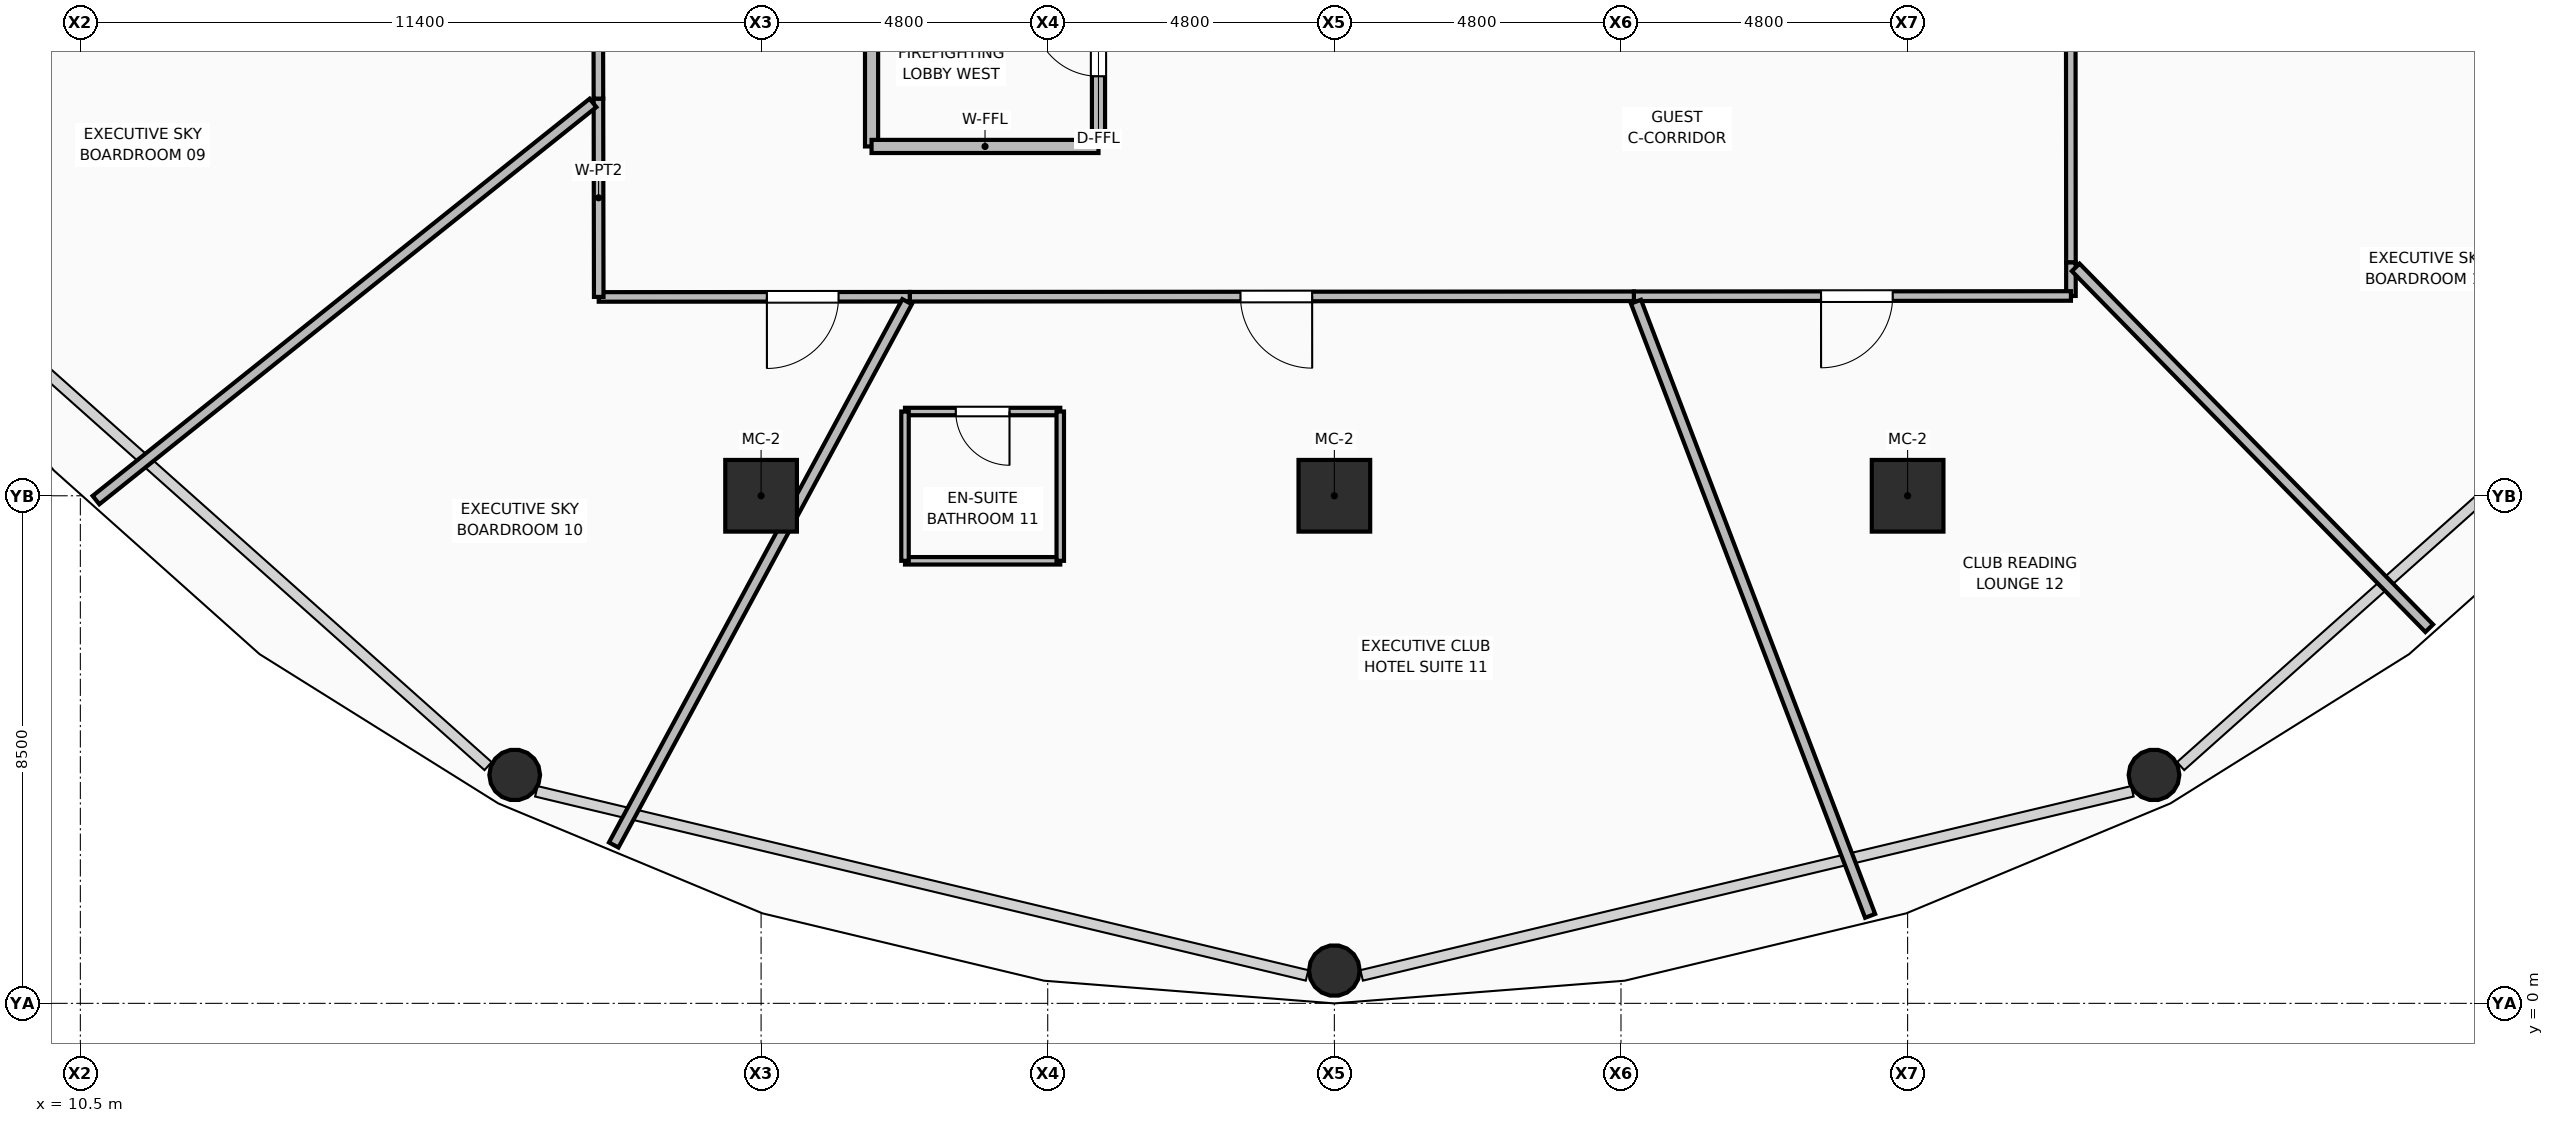
"""IFC4 building model, lengths in metres.
Left out: names, types, materials, properties, quantities, classifications, styles, units other than length and angle.
Written with IfcOpenShell. Run it as: python <this file> out.ifc"""

import sys

from ifc_helpers import new_model, si_unit, direction, frame, frame_2d, origin, origin_2d, place, context, subcontext, project, spatial, rectangle, hollow_rectangle, hollow_circle, extrude, element, fill, save


model = new_model("IFC4")
c1 = context("Model", 3, precision=1e-05, world=origin(), true_north=direction((0.0, 1.0)))
c2 = subcontext(c1, "Body", "Model", "MODEL_VIEW")
j1 = project(units=[si_unit("LENGTHUNIT", "METRE"), si_unit("PLANEANGLEUNIT", "RADIAN")], contexts=[c1])
p1 = place(None, origin())
s1 = spatial("IfcSite", under=j1, at=p1, CompositionType="ELEMENT")
p2 = place(p1, origin())
s2 = spatial("IfcBuilding", under=s1, at=p2, CompositionType="ELEMENT")
p3 = place(p2, frame((0.0, 0.0, 57.0)))
s3 = spatial("IfcBuildingStorey", under=s2, at=p3, CompositionType="ELEMENT", Elevation=57.0)
for number, where, z_axis, x_axis in (
    (1, (21.9, 8.5, 0.0), (0.0, 0.0, 1.0), (1.0, 0.0, 0.0)),
    (2, (31.5, 8.5, 0.0), (0.0, 0.0, 1.0), (1.0, 0.0, 0.0)),
    (3, (41.1, 8.5, 0.0), (0.0, 0.0, 1.0), (1.0, 0.0, 0.0)),
):
    element("IfcColumn", number, at=place(p3, frame(where, z_axis=z_axis, x_axis=x_axis)), inside=s3, PredefinedType="COLUMN", context=c2, shape_type="SweptSolid", body=[
        extrude(hollow_rectangle(XDim=1.2, YDim=1.2, WallThickness=0.045, at=origin_2d()), origin(), (0.0, 0.0, 1.0), 3.75),
    ])
for number, where, z_axis, x_axis in (
    (4, (17.774, 3.825, 0.0), (0.0, 0.0, 1.0), (1.0, 0.0, 0.0)),
    (5, (31.5, 0.549, 0.0), (0.0, 0.0, 1.0), (1.0, 0.0, 0.0)),
    (6, (45.226, 3.825, 0.0), (0.0, 0.0, 1.0), (1.0, 0.0, 0.0)),
):
    element("IfcColumn", number, at=place(p3, frame(where, z_axis=z_axis, x_axis=x_axis)), inside=s3, PredefinedType="COLUMN", context=c2, shape_type="SweptSolid", body=[
        extrude(hollow_circle(Radius=0.425, WallThickness=0.04, at=origin_2d()), origin(), (0.0, 0.0, 1.0), 3.57),
    ])
p4 = place(p3, frame((23.75, 14.35, 0.0), z_axis=(0.0, 0.0, 1.0), x_axis=(0.0, 1.0, 0.0)))
e7 = element("IfcWall", 7, at=p4, inside=s3, PredefinedType="PARTITIONING", context=c2, shape_type="SweptSolid", body=[
    extrude(rectangle(XDim=3.45, YDim=0.22, at=frame_2d((1.725, 0.0))), origin(), (0.0, 0.0, 1.0), 2.928),
])
p5 = place(p3, frame((23.75, 14.35, 0.0), z_axis=(0.0, 0.0, 1.0), x_axis=(1.0, 0.0, 0.0)))
e8 = element("IfcWall", 8, at=p5, inside=s3, PredefinedType="PARTITIONING", context=c2, shape_type="SweptSolid", body=[
    extrude(rectangle(XDim=3.8, YDim=0.22, at=frame_2d((1.9, 0.0))), origin(), (0.0, 0.0, 1.0), 3.55),
])
p6 = place(p3, frame((27.55, 14.35, 0.0), z_axis=(0.0, 0.0, 1.0), x_axis=(0.0, 1.0, 0.0)))
e9 = element("IfcWall", 9, at=p6, inside=s3, PredefinedType="PARTITIONING", context=c2, shape_type="SweptSolid", body=[
    extrude(rectangle(XDim=3.45, YDim=0.22, at=frame_2d((1.725, 0.0))), origin(), (0.0, 0.0, 1.0), 2.928),
])
p7 = place(p6, frame((1.175, 0.0, 0.0)))
e10 = element("IfcOpeningElement", 10, at=p7, cuts=e9, PredefinedType="OPENING", context=c2, shape_type="SweptSolid", body=[
    extrude(rectangle(XDim=1.1, YDim=2.1, at=frame_2d((0.55, 1.05))), frame((0.0, 0.12, 0.0), z_axis=(0.0, -1.0, 0.0), x_axis=(1.0, 0.0, 0.0)), (0.0, 0.0, 1.0), 0.24),
])
p8 = place(p3, frame((43.83, 19.568, 0.0), z_axis=(0.0, 0.0, 1.0), x_axis=(0.000681849016, -0.999999767541, 0.0)))
e11 = element("IfcWall", 11, at=p8, inside=s3, PredefinedType="PARTITIONING", context=c2, shape_type="SweptSolid", body=[
    extrude(rectangle(XDim=7.161, YDim=0.16, at=frame_2d((3.581, 0.0))), origin(), (0.0, 0.0, 1.0), 2.928),
])
p9 = place(p8, frame((0.605, 0.0, 0.0)))
e12 = element("IfcOpeningElement", 12, at=p9, cuts=e11, PredefinedType="OPENING", context=c2, shape_type="SweptSolid", body=[
    extrude(rectangle(XDim=1.2, YDim=2.1, at=frame_2d((0.6, 1.05))), frame((0.0, 0.09, 0.0), z_axis=(0.0, -1.0, 0.0), x_axis=(1.0, 0.0, 0.0)), (0.0, 0.0, 1.0), 0.18),
])
p10 = place(p3, frame((43.835, 12.407, 0.0), z_axis=(0.0, 0.0, 1.0), x_axis=(0.0, -1.0, 0.0)))
e13 = element("IfcWall", 13, at=p10, inside=s3, PredefinedType="PARTITIONING", context=c2, shape_type="SweptSolid", body=[
    extrude(rectangle(XDim=0.561, YDim=0.16, at=frame_2d((0.281, 0.0))), origin(), (0.0, 0.0, 1.0), 3.55),
])
p11 = place(p3, frame((43.835, 11.846, 0.0), z_axis=(0.0, 0.0, 1.0), x_axis=(-0.999999777452, -0.000667155766, 0.0)))
e14 = element("IfcWall", 14, at=p11, inside=s3, PredefinedType="PARTITIONING", context=c2, shape_type="SweptSolid", body=[
    extrude(rectangle(XDim=7.319, YDim=0.16, at=frame_2d((3.659, 0.0))), origin(), (0.0, 0.0, 1.0), 2.928),
])
p12 = place(p11, frame((2.985, 0.0, 0.0)))
e15 = element("IfcOpeningElement", 15, at=p12, cuts=e14, PredefinedType="OPENING", context=c2, shape_type="SweptSolid", body=[
    extrude(rectangle(XDim=1.2, YDim=2.1, at=frame_2d((0.6, 1.05))), frame((0.0, 0.09, 0.0), z_axis=(0.0, -1.0, 0.0), x_axis=(1.0, 0.0, 0.0)), (0.0, 0.0, 1.0), 0.18),
])
p13 = place(p3, frame((36.516, 11.841, 0.0), z_axis=(0.0, 0.0, 1.0), x_axis=(-0.999999779288, -0.00066439817, 0.0)))
e16 = element("IfcWall", 16, at=p13, inside=s3, PredefinedType="PARTITIONING", context=c2, shape_type="SweptSolid", body=[
    extrude(rectangle(XDim=12.126, YDim=0.16, at=frame_2d((6.063, 0.0))), origin(), (0.0, 0.0, 1.0), 2.928),
])
p14 = place(p13, frame((5.388, 0.0, 0.0)))
e17 = element("IfcOpeningElement", 17, at=p14, cuts=e16, PredefinedType="OPENING", context=c2, shape_type="SweptSolid", body=[
    extrude(rectangle(XDim=1.2, YDim=2.1, at=frame_2d((0.6, 1.05))), frame((0.0, 0.09, 0.0), z_axis=(0.0, -1.0, 0.0), x_axis=(1.0, 0.0, 0.0)), (0.0, 0.0, 1.0), 0.18),
])
p15 = place(p3, frame((24.39, 11.833, 0.0), z_axis=(0.0, 0.0, 1.0), x_axis=(-0.999999841836, -0.000562429607, 0.0)))
e18 = element("IfcWall", 18, at=p15, inside=s3, PredefinedType="PARTITIONING", context=c2, shape_type="SweptSolid", body=[
    extrude(rectangle(XDim=5.209, YDim=0.16, at=frame_2d((2.604, 0.0))), origin(), (0.0, 0.0, 1.0), 2.928),
])
p16 = place(p15, frame((1.193, 0.0, 0.0)))
e19 = element("IfcOpeningElement", 19, at=p16, cuts=e18, PredefinedType="OPENING", context=c2, shape_type="SweptSolid", body=[
    extrude(rectangle(XDim=1.2, YDim=2.1, at=frame_2d((0.6, 1.05))), frame((0.0, 0.09, 0.0), z_axis=(0.0, -1.0, 0.0), x_axis=(1.0, 0.0, 0.0)), (0.0, 0.0, 1.0), 0.18),
])
p17 = place(p3, frame((19.181, 11.83, 0.0), z_axis=(0.0, 0.0, 1.0), x_axis=(-0.001470370415, 0.999998919005, 0.0)))
e20 = element("IfcWall", 20, at=p17, inside=s3, PredefinedType="PARTITIONING", context=c2, shape_type="SweptSolid", body=[
    extrude(rectangle(XDim=3.321, YDim=0.16, at=frame_2d((1.66, 0.0))), origin(), (0.0, 0.0, 1.0), 3.55),
])
p18 = place(p3, frame((19.176, 15.151, 0.0), z_axis=(0.0, 0.0, 1.0), x_axis=(-0.001827037145, 0.999998330966, 0.0)))
e21 = element("IfcWall", 21, at=p18, inside=s3, PredefinedType="PARTITIONING", context=c2, shape_type="SweptSolid", body=[
    extrude(rectangle(XDim=6.013, YDim=0.16, at=frame_2d((3.007, 0.0))), origin(), (0.0, 0.0, 1.0), 2.928),
])
p19 = place(p18, frame((4.204, 0.0, 0.0)))
e22 = element("IfcOpeningElement", 22, at=p19, cuts=e21, PredefinedType="OPENING", context=c2, shape_type="SweptSolid", body=[
    extrude(rectangle(XDim=1.2, YDim=2.1, at=frame_2d((0.6, 1.05))), frame((0.0, 0.09, 0.0), z_axis=(0.0, -1.0, 0.0), x_axis=(1.0, 0.0, 0.0)), (0.0, 0.0, 1.0), 0.18),
])
p20 = place(p3, frame((19.085, 15.079, 0.0), z_axis=(0.0, 0.0, 1.0), x_axis=(-0.781201807071, -0.624278572938, 0.0)))
e23 = element("IfcWall", 23, at=p20, inside=s3, PredefinedType="PARTITIONING", context=c2, shape_type="SweptSolid", body=[
    extrude(rectangle(XDim=10.654, YDim=0.18, at=frame_2d((5.327, 0.0))), origin(), (0.0, 0.0, 1.0), 2.775),
])
p21 = place(p3, frame((24.345, 11.75, 0.0), z_axis=(0.0, 0.0, 1.0), x_axis=(-0.475165367646, -0.879896512887, 0.0)))
e24 = element("IfcWall", 24, at=p21, inside=s3, PredefinedType="PARTITIONING", context=c2, shape_type="SweptSolid", body=[
    extrude(rectangle(XDim=10.34, YDim=0.18, at=frame_2d((5.17, 0.0))), origin(), (0.0, 0.0, 1.0), 2.775),
])
p22 = place(p3, frame((36.551, 11.75, 0.0), z_axis=(0.0, 0.0, 1.0), x_axis=(0.356220373455, -0.934401972138, 0.0)))
e25 = element("IfcWall", 25, at=p22, inside=s3, PredefinedType="PARTITIONING", context=c2, shape_type="SweptSolid", body=[
    extrude(rectangle(XDim=11.007, YDim=0.18, at=frame_2d((5.503, 0.0))), origin(), (0.0, 0.0, 1.0), 2.775),
])
p23 = place(p3, frame((43.915, 12.325, 0.0), z_axis=(0.0, 0.0, 1.0), x_axis=(0.699796666029, -0.714342093268, 0.0)))
e26 = element("IfcWall", 26, at=p23, inside=s3, PredefinedType="PARTITIONING", context=c2, shape_type="SweptSolid", body=[
    extrude(rectangle(XDim=8.459, YDim=0.18, at=frame_2d((4.23, 0.0))), origin(), (0.0, 0.0, 1.0), 2.775),
])
p24 = place(p3, frame((43.915, 19.531, 0.0), z_axis=(0.0, 0.0, 1.0), x_axis=(0.915142788341, -0.403129851223, 0.0)))
e27 = element("IfcWall", 27, at=p24, inside=s3, PredefinedType="PARTITIONING", context=c2, shape_type="SweptSolid", body=[
    extrude(rectangle(XDim=13.675, YDim=0.18, at=frame_2d((6.838, 0.0))), origin(), (0.0, 0.0, 1.0), 2.775),
])
p25 = place(p3, frame((24.31, 7.411, 0.0), z_axis=(0.0, 0.0, 1.0), x_axis=(1.0, 0.0, 0.0)))
e28 = element("IfcWall", 28, at=p25, inside=s3, PredefinedType="PARTITIONING", context=c2, shape_type="SweptSolid", body=[
    extrude(rectangle(XDim=2.6, YDim=0.125, at=frame_2d((1.3, 0.0))), origin(), (0.0, 0.0, 1.0), 3.55),
])
p26 = place(p3, frame((24.31, 9.911, 0.0), z_axis=(0.0, 0.0, 1.0), x_axis=(1.0, 0.0, 0.0)))
e29 = element("IfcWall", 29, at=p26, inside=s3, PredefinedType="PARTITIONING", context=c2, shape_type="SweptSolid", body=[
    extrude(rectangle(XDim=2.6, YDim=0.125, at=frame_2d((1.3, 0.0))), origin(), (0.0, 0.0, 1.0), 3.55),
])
p27 = place(p26, frame((0.85, 0.0, 0.0)))
e30 = element("IfcOpeningElement", 30, at=p27, cuts=e29, PredefinedType="OPENING", context=c2, shape_type="SweptSolid", body=[
    extrude(rectangle(XDim=0.9, YDim=2.1, at=frame_2d((0.45, 1.05))), frame((0.0, 0.073, 0.0), z_axis=(0.0, -1.0, 0.0), x_axis=(1.0, 0.0, 0.0)), (0.0, 0.0, 1.0), 0.145),
])
for number, where, z_axis, x_axis in (
    (31, (24.31, 7.411, 0.0), (0.0, 0.0, 1.0), (0.0, 1.0, 0.0)),
    (32, (26.91, 7.411, 0.0), (0.0, 0.0, 1.0), (0.0, 1.0, 0.0)),
):
    element("IfcWall", number, at=place(p3, frame(where, z_axis=z_axis, x_axis=x_axis)), inside=s3, PredefinedType="PARTITIONING", context=c2, shape_type="SweptSolid", body=[
        extrude(rectangle(XDim=2.5, YDim=0.125, at=frame_2d((1.25, 0.0))), origin(), (0.0, 0.0, 1.0), 3.55),
    ])
p28 = place(p7, origin())
e33 = element("IfcDoor", 33, at=p28, inside=s3, OperationType="SINGLE_SWING_RIGHT", PredefinedType="DOOR", context=c2, shape_type="SweptSolid", body=[
    extrude(rectangle(XDim=1.1, YDim=2.1, at=frame_2d((0.55, 1.05))), frame((0.0, 0.025, 0.0), z_axis=(0.0, -1.0, 0.0), x_axis=(1.0, 0.0, 0.0)), (0.0, 0.0, 1.0), 0.05),
])
fill(e10, e33)
p29 = place(p16, origin())
e34 = element("IfcDoor", 34, at=p29, inside=s3, OperationType="SINGLE_SWING_RIGHT", PredefinedType="DOOR", context=c2, shape_type="SweptSolid", body=[
    extrude(rectangle(XDim=1.2, YDim=2.1, at=frame_2d((0.6, 1.05))), frame((0.0, 0.025, 0.0), z_axis=(0.0, -1.0, 0.0), x_axis=(1.0, 0.0, 0.0)), (0.0, 0.0, 1.0), 0.05),
])
fill(e19, e34)
p30 = place(p27, frame((0.9, 0.0, 0.0), z_axis=(0.0, 0.0, 1.0), x_axis=(-1.0, 0.0, 0.0)))
e35 = element("IfcDoor", 35, at=p30, inside=s3, OperationType="SINGLE_SWING_LEFT", PredefinedType="DOOR", context=c2, shape_type="SweptSolid", body=[
    extrude(rectangle(XDim=0.9, YDim=2.1, at=frame_2d((0.45, 1.05))), frame((0.0, 0.025, 0.0), z_axis=(0.0, -1.0, 0.0), x_axis=(1.0, 0.0, 0.0)), (0.0, 0.0, 1.0), 0.05),
])
fill(e30, e35)
p31 = place(p14, origin())
e36 = element("IfcDoor", 36, at=p31, inside=s3, OperationType="SINGLE_SWING_LEFT", PredefinedType="DOOR", context=c2, shape_type="SweptSolid", body=[
    extrude(rectangle(XDim=1.2, YDim=2.1, at=frame_2d((0.6, 1.05))), frame((0.0, 0.025, 0.0), z_axis=(0.0, -1.0, 0.0), x_axis=(1.0, 0.0, 0.0)), (0.0, 0.0, 1.0), 0.05),
])
fill(e17, e36)
p32 = place(p12, origin())
e37 = element("IfcDoor", 37, at=p32, inside=s3, OperationType="SINGLE_SWING_RIGHT", PredefinedType="DOOR", context=c2, shape_type="SweptSolid", body=[
    extrude(rectangle(XDim=1.2, YDim=2.1, at=frame_2d((0.6, 1.05))), frame((0.0, 0.025, 0.0), z_axis=(0.0, -1.0, 0.0), x_axis=(1.0, 0.0, 0.0)), (0.0, 0.0, 1.0), 0.05),
])
fill(e15, e37)
save(model, sys.argv[1])
